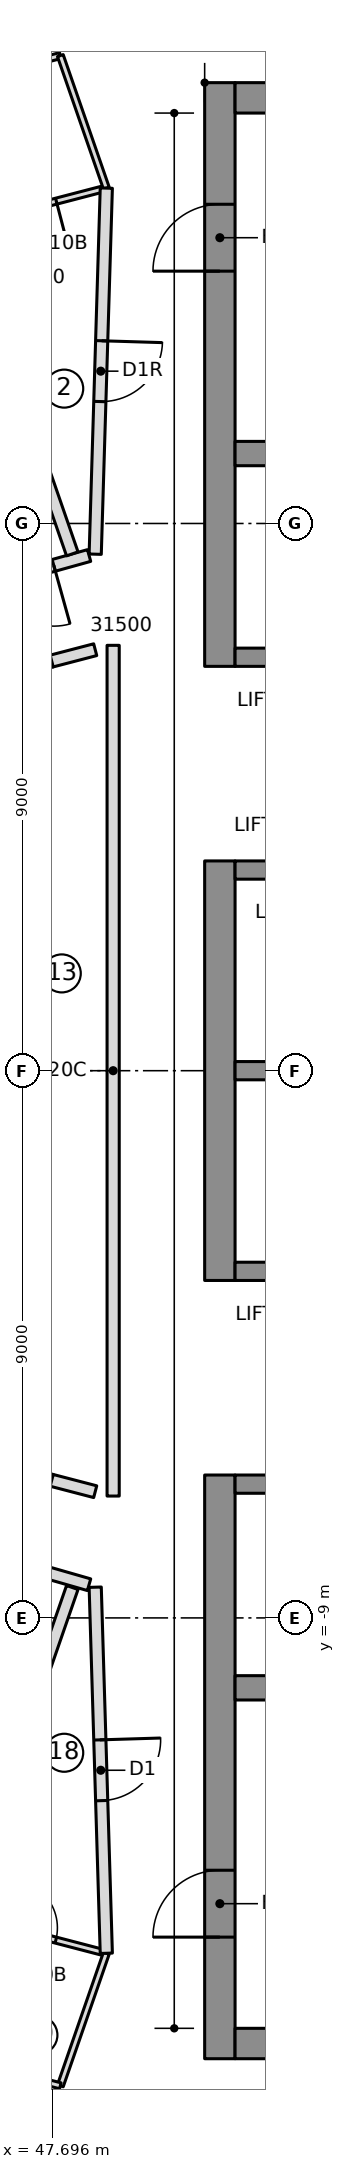
"""IFC4 building model, lengths in metres.
Left out: names, types, materials, properties, quantities, classifications, styles, units other than length and angle.
Written with IfcOpenShell. Run it as: python <this file> out.ifc"""

import sys

from ifc_helpers import new_model, si_unit, direction, frame, frame_2d, origin, place, context, subcontext, project, spatial, rectangle, extrude, element, fill, save


model = new_model("IFC4")
c1 = context("Model", 3, precision=1e-05, world=origin(), true_north=direction((0.0, 1.0)))
c2 = subcontext(c1, "Body", "Model", "MODEL_VIEW")
j1 = project(units=[si_unit("LENGTHUNIT", "METRE"), si_unit("PLANEANGLEUNIT", "RADIAN")], contexts=[c1])
p1 = place(None, origin())
s1 = spatial("IfcSite", under=j1, at=p1, CompositionType="ELEMENT")
p2 = place(p1, origin())
s2 = spatial("IfcBuilding", under=s1, at=p2, CompositionType="ELEMENT")
p3 = place(p2, frame((0.0, 0.0, 285.65)))
s3 = spatial("IfcBuildingStorey", under=s2, at=p3, CompositionType="ELEMENT", Elevation=285.65)
p4 = place(p3, frame((50.45, 6.65, 0.0), z_axis=(0.0, 0.0, 1.0), x_axis=(0.0, 1.0, 0.0)))
e1 = element("IfcWall", 1, at=p4, inside=s3, PredefinedType="SHEAR", context=c2, shape_type="SweptSolid", body=[
    extrude(rectangle(XDim=9.6, YDim=0.5, at=frame_2d((4.8, 0.0))), origin(), (0.0, 0.0, 1.0), 3.55),
])
p5 = place(p4, frame((6.5, 0.0, 0.0)))
e2 = element("IfcOpeningElement", 2, at=p5, cuts=e1, PredefinedType="OPENING", context=c2, shape_type="SweptSolid", body=[
    extrude(rectangle(XDim=1.1, YDim=2.1, at=frame_2d((0.55, 1.05))), frame((0.0, 0.26, 0.0), z_axis=(0.0, -1.0, 0.0), x_axis=(1.0, 0.0, 0.0)), (0.0, 0.0, 1.0), 0.52),
])
p6 = place(p3, frame((50.45, -3.45, 0.0), z_axis=(0.0, 0.0, 1.0), x_axis=(0.0, 1.0, 0.0)))
e3 = element("IfcWall", 3, at=p6, inside=s3, PredefinedType="SHEAR", context=c2, shape_type="SweptSolid", body=[
    extrude(rectangle(XDim=6.9, YDim=0.5, at=frame_2d((3.45, 0.0))), origin(), (0.0, 0.0, 1.0), 3.55),
])
p7 = place(p3, frame((50.45, -16.25, 0.0), z_axis=(0.0, 0.0, 1.0), x_axis=(0.0, 1.0, 0.0)))
e4 = element("IfcWall", 4, at=p7, inside=s3, PredefinedType="SHEAR", context=c2, shape_type="SweptSolid", body=[
    extrude(rectangle(XDim=9.6, YDim=0.5, at=frame_2d((4.8, 0.0))), origin(), (0.0, 0.0, 1.0), 3.55),
])
p8 = place(p7, frame((2.0, 0.0, 0.0)))
e5 = element("IfcOpeningElement", 5, at=p8, cuts=e4, PredefinedType="OPENING", context=c2, shape_type="SweptSolid", body=[
    extrude(rectangle(XDim=1.1, YDim=2.1, at=frame_2d((0.55, 1.05))), frame((0.0, 0.26, 0.0), z_axis=(0.0, -1.0, 0.0), x_axis=(1.0, 0.0, 0.0)), (0.0, 0.0, 1.0), 0.52),
])
for number, where, z_axis, x_axis in (
    (6, (50.7, 16.0, 0.0), (0.0, 0.0, 1.0), (1.0, 0.0, 0.0)),
    (7, (50.7, -16.0, 0.0), (0.0, 0.0, 1.0), (1.0, 0.0, 0.0)),
):
    element("IfcWall", number, at=place(p3, frame(where, z_axis=z_axis, x_axis=x_axis)), inside=s3, PredefinedType="SHEAR", context=c2, shape_type="SweptSolid", body=[
        extrude(rectangle(XDim=13.52, YDim=0.5, at=frame_2d((6.76, 0.0))), origin(), (0.0, 0.0, 1.0), 3.55),
    ])
p9 = place(p3, frame((50.7, 10.15, 0.0), z_axis=(0.0, 0.0, 1.0), x_axis=(1.0, 0.0, 0.0)))
e8 = element("IfcWall", 8, at=p9, inside=s3, PredefinedType="SHEAR", context=c2, shape_type="SweptSolid", body=[
    extrude(rectangle(XDim=13.02, YDim=0.4, at=frame_2d((6.51, 0.0))), origin(), (0.0, 0.0, 1.0), 3.55),
])
p10 = place(p9, frame((0.7, 0.0, 0.0)))
e9 = element("IfcOpeningElement", 9, at=p10, cuts=e8, PredefinedType="OPENING", context=c2, shape_type="SweptSolid", body=[
    extrude(rectangle(XDim=1.1, YDim=2.1, at=frame_2d((0.55, 1.05))), frame((0.0, 0.21, 0.0), z_axis=(0.0, -1.0, 0.0), x_axis=(1.0, 0.0, 0.0)), (0.0, 0.0, 1.0), 0.42),
])
p11 = place(p9, frame((3.5, 0.0, 0.0)))
e10 = element("IfcOpeningElement", 10, at=p11, cuts=e8, PredefinedType="OPENING", context=c2, shape_type="SweptSolid", body=[
    extrude(rectangle(XDim=1.1, YDim=2.1, at=frame_2d((0.55, 1.05))), frame((0.0, 0.21, 0.0), z_axis=(0.0, -1.0, 0.0), x_axis=(1.0, 0.0, 0.0)), (0.0, 0.0, 1.0), 0.42),
])
p12 = place(p3, frame((50.7, -10.15, 0.0), z_axis=(0.0, 0.0, 1.0), x_axis=(1.0, 0.0, 0.0)))
e11 = element("IfcWall", 11, at=p12, inside=s3, PredefinedType="SHEAR", context=c2, shape_type="SweptSolid", body=[
    extrude(rectangle(XDim=13.02, YDim=0.4, at=frame_2d((6.51, 0.0))), origin(), (0.0, 0.0, 1.0), 3.55),
])
p13 = place(p3, frame((50.7, 0.0, 0.0), z_axis=(0.0, 0.0, 1.0), x_axis=(1.0, 0.0, 0.0)))
e12 = element("IfcWall", 12, at=p13, inside=s3, PredefinedType="SHEAR", context=c2, shape_type="SweptSolid", body=[
    extrude(rectangle(XDim=10.9, YDim=0.3, at=frame_2d((5.45, 0.0))), origin(), (0.0, 0.0, 1.0), 3.55),
])
p14 = place(p3, frame((50.7, 3.3, 0.0), z_axis=(0.0, 0.0, 1.0), x_axis=(1.0, 0.0, 0.0)))
e13 = element("IfcWall", 13, at=p14, inside=s3, PredefinedType="SHEAR", context=c2, shape_type="SweptSolid", body=[
    extrude(rectangle(XDim=10.9, YDim=0.3, at=frame_2d((5.45, 0.0))), origin(), (0.0, 0.0, 1.0), 3.55),
])
p15 = place(p14, frame((0.7, 0.0, 0.0)))
e14 = element("IfcOpeningElement", 14, at=p15, cuts=e13, PredefinedType="OPENING", context=c2, shape_type="SweptSolid", body=[
    extrude(rectangle(XDim=1.1, YDim=2.1, at=frame_2d((0.55, 1.05))), frame((0.0, 0.16, 0.0), z_axis=(0.0, -1.0, 0.0), x_axis=(1.0, 0.0, 0.0)), (0.0, 0.0, 1.0), 0.32),
])
p16 = place(p14, frame((3.5, 0.0, 0.0)))
e15 = element("IfcOpeningElement", 15, at=p16, cuts=e13, PredefinedType="OPENING", context=c2, shape_type="SweptSolid", body=[
    extrude(rectangle(XDim=1.1, YDim=2.1, at=frame_2d((0.55, 1.05))), frame((0.0, 0.16, 0.0), z_axis=(0.0, -1.0, 0.0), x_axis=(1.0, 0.0, 0.0)), (0.0, 0.0, 1.0), 0.32),
])
p17 = place(p14, frame((6.4, 0.0, 0.0)))
e16 = element("IfcOpeningElement", 16, at=p17, cuts=e13, PredefinedType="OPENING", context=c2, shape_type="SweptSolid", body=[
    extrude(rectangle(XDim=0.9, YDim=2.1, at=frame_2d((0.45, 1.05))), frame((0.0, 0.16, 0.0), z_axis=(0.0, -1.0, 0.0), x_axis=(1.0, 0.0, 0.0)), (0.0, 0.0, 1.0), 0.32),
])
p18 = place(p14, frame((9.2, 0.0, 0.0)))
e17 = element("IfcOpeningElement", 17, at=p18, cuts=e13, PredefinedType="OPENING", context=c2, shape_type="SweptSolid", body=[
    extrude(rectangle(XDim=0.9, YDim=2.1, at=frame_2d((0.45, 1.05))), frame((0.0, 0.16, 0.0), z_axis=(0.0, -1.0, 0.0), x_axis=(1.0, 0.0, 0.0)), (0.0, 0.0, 1.0), 0.32),
])
p19 = place(p3, frame((50.7, 6.8, 0.0), z_axis=(0.0, 0.0, 1.0), x_axis=(1.0, 0.0, 0.0)))
e18 = element("IfcWall", 18, at=p19, inside=s3, PredefinedType="SHEAR", context=c2, shape_type="SweptSolid", body=[
    extrude(rectangle(XDim=10.9, YDim=0.3, at=frame_2d((5.45, 0.0))), origin(), (0.0, 0.0, 1.0), 3.55),
])
p20 = place(p19, frame((6.4, 0.0, 0.0)))
e19 = element("IfcOpeningElement", 19, at=p20, cuts=e18, PredefinedType="OPENING", context=c2, shape_type="SweptSolid", body=[
    extrude(rectangle(XDim=0.9, YDim=2.1, at=frame_2d((0.45, 1.05))), frame((0.0, 0.16, 0.0), z_axis=(0.0, -1.0, 0.0), x_axis=(1.0, 0.0, 0.0)), (0.0, 0.0, 1.0), 0.32),
])
p21 = place(p19, frame((9.2, 0.0, 0.0)))
e20 = element("IfcOpeningElement", 20, at=p21, cuts=e18, PredefinedType="OPENING", context=c2, shape_type="SweptSolid", body=[
    extrude(rectangle(XDim=0.9, YDim=2.1, at=frame_2d((0.45, 1.05))), frame((0.0, 0.16, 0.0), z_axis=(0.0, -1.0, 0.0), x_axis=(1.0, 0.0, 0.0)), (0.0, 0.0, 1.0), 0.32),
])
p22 = place(p3, frame((50.7, -3.3, 0.0), z_axis=(0.0, 0.0, 1.0), x_axis=(1.0, 0.0, 0.0)))
e21 = element("IfcWall", 21, at=p22, inside=s3, PredefinedType="SHEAR", context=c2, shape_type="SweptSolid", body=[
    extrude(rectangle(XDim=10.9, YDim=0.3, at=frame_2d((5.45, 0.0))), origin(), (0.0, 0.0, 1.0), 3.55),
])
p23 = place(p22, frame((9.1, 0.0, 0.0)))
e22 = element("IfcOpeningElement", 22, at=p23, cuts=e21, PredefinedType="OPENING", context=c2, shape_type="SweptSolid", body=[
    extrude(rectangle(XDim=1.1, YDim=2.1, at=frame_2d((0.55, 1.05))), frame((0.0, 0.16, 0.0), z_axis=(0.0, -1.0, 0.0), x_axis=(1.0, 0.0, 0.0)), (0.0, 0.0, 1.0), 0.32),
])
p24 = place(p3, frame((50.7, -6.8, 0.0), z_axis=(0.0, 0.0, 1.0), x_axis=(1.0, 0.0, 0.0)))
e23 = element("IfcWall", 23, at=p24, inside=s3, PredefinedType="SHEAR", context=c2, shape_type="SweptSolid", body=[
    extrude(rectangle(XDim=10.9, YDim=0.3, at=frame_2d((5.45, 0.0))), origin(), (0.0, 0.0, 1.0), 3.55),
])
p25 = place(p24, frame((6.3, 0.0, 0.0)))
e24 = element("IfcOpeningElement", 24, at=p25, cuts=e23, PredefinedType="OPENING", context=c2, shape_type="SweptSolid", body=[
    extrude(rectangle(XDim=1.1, YDim=2.1, at=frame_2d((0.55, 1.05))), frame((0.0, 0.16, 0.0), z_axis=(0.0, -1.0, 0.0), x_axis=(1.0, 0.0, 0.0)), (0.0, 0.0, 1.0), 0.32),
])
p26 = place(p24, frame((9.1, 0.0, 0.0)))
e25 = element("IfcOpeningElement", 25, at=p26, cuts=e23, PredefinedType="OPENING", context=c2, shape_type="SweptSolid", body=[
    extrude(rectangle(XDim=1.1, YDim=2.1, at=frame_2d((0.55, 1.05))), frame((0.0, 0.16, 0.0), z_axis=(0.0, -1.0, 0.0), x_axis=(1.0, 0.0, 0.0)), (0.0, 0.0, 1.0), 0.32),
])
p27 = place(p24, frame((0.8, 0.0, 0.0)))
e26 = element("IfcOpeningElement", 26, at=p27, cuts=e23, PredefinedType="OPENING", context=c2, shape_type="SweptSolid", body=[
    extrude(rectangle(XDim=0.9, YDim=2.1, at=frame_2d((0.45, 1.05))), frame((0.0, 0.16, 0.0), z_axis=(0.0, -1.0, 0.0), x_axis=(1.0, 0.0, 0.0)), (0.0, 0.0, 1.0), 0.32),
])
p28 = place(p24, frame((3.6, 0.0, 0.0)))
e27 = element("IfcOpeningElement", 27, at=p28, cuts=e23, PredefinedType="OPENING", context=c2, shape_type="SweptSolid", body=[
    extrude(rectangle(XDim=0.9, YDim=2.1, at=frame_2d((0.45, 1.05))), frame((0.0, 0.16, 0.0), z_axis=(0.0, -1.0, 0.0), x_axis=(1.0, 0.0, 0.0)), (0.0, 0.0, 1.0), 0.32),
])
p29 = place(p3, frame((48.299, 8.473, 0.0), z_axis=(0.0, 0.0, 1.0), x_axis=(-0.96343417102, -0.267945140115, 0.0)))
e28 = element("IfcWall", 28, at=p29, inside=s3, PredefinedType="PARTITIONING", context=c2, shape_type="SweptSolid", body=[
    extrude(rectangle(XDim=4.43, YDim=0.2, at=frame_2d((2.215, 0.0))), origin(), (0.0, 0.0, 1.0), 3.25),
])
p30 = place(p29, frame((0.603, 0.0, 0.0)))
e29 = element("IfcOpeningElement", 29, at=p30, cuts=e28, PredefinedType="OPENING", context=c2, shape_type="SweptSolid", body=[
    extrude(rectangle(XDim=1.0, YDim=2.1, at=frame_2d((0.5, 1.05))), frame((0.0, 0.11, 0.0), z_axis=(0.0, -1.0, 0.0), x_axis=(1.0, 0.0, 0.0)), (0.0, 0.0, 1.0), 0.22),
])
p31 = place(p3, frame((48.023, 8.5, 0.0), z_axis=(0.0, 0.0, 1.0), x_axis=(-0.327705598625, 0.944779890043, 0.0)))
e30 = element("IfcWall", 30, at=p31, inside=s3, PredefinedType="PARTITIONING", context=c2, shape_type="SweptSolid", body=[
    extrude(rectangle(XDim=9.61, YDim=0.2, at=frame_2d((4.805, 0.0))), origin(), (0.0, 0.0, 1.0), 3.25),
])
p32 = place(p3, frame((48.583, 14.516, 0.0), z_axis=(0.0, 0.0, 1.0), x_axis=(-0.967665843663, -0.252235633897, 0.0)))
e31 = element("IfcWall", 31, at=p32, inside=s3, PredefinedType="PARTITIONING", context=c2, shape_type="SweptSolid", body=[
    extrude(rectangle(XDim=2.508, YDim=0.1, at=frame_2d((1.254, 0.0))), origin(), (0.0, 0.0, 1.0), 3.25),
])
p33 = place(p32, frame((0.85, 0.0, 0.0)))
e32 = element("IfcOpeningElement", 32, at=p33, cuts=e31, PredefinedType="OPENING", context=c2, shape_type="SweptSolid", body=[
    extrude(rectangle(XDim=0.8, YDim=2.1, at=frame_2d((0.4, 1.05))), frame((0.0, 0.06, 0.0), z_axis=(0.0, -1.0, 0.0), x_axis=(1.0, 0.0, 0.0)), (0.0, 0.0, 1.0), 0.12),
])
p34 = place(p3, frame((45.955, 16.208, 0.0), z_axis=(0.0, 0.0, 1.0), x_axis=(0.967650770907, 0.25229345129, 0.0)))
e33 = element("IfcWall", 33, at=p34, inside=s3, PredefinedType="PARTITIONING", context=c2, shape_type="SweptSolid", body=[
    extrude(rectangle(XDim=1.934, YDim=0.1, at=frame_2d((0.967, 0.0))), origin(), (0.0, 0.0, 1.0), 3.25),
])
p35 = place(p3, frame((47.826, 16.696, 0.0), z_axis=(0.0, 0.0, 1.0), x_axis=(0.327695604762, -0.944783356447, 0.0)))
e34 = element("IfcWall", 34, at=p35, inside=s3, PredefinedType="PARTITIONING", context=c2, shape_type="SweptSolid", body=[
    extrude(rectangle(XDim=2.307, YDim=0.1, at=frame_2d((1.154, 0.0))), origin(), (0.0, 0.0, 1.0), 3.25),
])
p36 = place(p3, frame((40.035, -6.083, 0.0), z_axis=(0.0, 0.0, 1.0), x_axis=(0.961195333593, -0.275868683759, 0.0)))
e35 = element("IfcWall", 35, at=p36, inside=s3, PredefinedType="PARTITIONING", context=c2, shape_type="SweptSolid", body=[
    extrude(rectangle(XDim=8.597, YDim=0.2, at=frame_2d((4.298, 0.0))), origin(), (0.0, 0.0, 1.0), 3.25),
])
p37 = place(p36, frame((3.05, 0.0, 0.0)))
e36 = element("IfcOpeningElement", 36, at=p37, cuts=e35, PredefinedType="OPENING", context=c2, shape_type="SweptSolid", body=[
    extrude(rectangle(XDim=1.5, YDim=2.1, at=frame_2d((0.75, 1.05))), frame((0.0, 0.11, 0.0), z_axis=(0.0, -1.0, 0.0), x_axis=(1.0, 0.0, 0.0)), (0.0, 0.0, 1.0), 0.22),
])
p38 = place(p3, frame((44.874, -17.579, 0.0), z_axis=(0.0, 0.0, 1.0), x_axis=(0.327705598625, 0.944779890043, 0.0)))
e37 = element("IfcWall", 37, at=p38, inside=s3, PredefinedType="PARTITIONING", context=c2, shape_type="SweptSolid", body=[
    extrude(rectangle(XDim=9.61, YDim=0.2, at=frame_2d((4.805, 0.0))), origin(), (0.0, 0.0, 1.0), 3.25),
])
p39 = place(p3, frame((46.156, -13.883, 0.0), z_axis=(0.0, 0.0, 1.0), x_axis=(0.967665843663, -0.252235633897, 0.0)))
e38 = element("IfcWall", 38, at=p39, inside=s3, PredefinedType="PARTITIONING", context=c2, shape_type="SweptSolid", body=[
    extrude(rectangle(XDim=2.508, YDim=0.1, at=frame_2d((1.254, 0.0))), origin(), (0.0, 0.0, 1.0), 3.25),
])
p40 = place(p39, frame((0.85, 0.0, 0.0)))
e39 = element("IfcOpeningElement", 39, at=p40, cuts=e38, PredefinedType="OPENING", context=c2, shape_type="SweptSolid", body=[
    extrude(rectangle(XDim=0.8, YDim=2.1, at=frame_2d((0.4, 1.05))), frame((0.0, 0.06, 0.0), z_axis=(0.0, -1.0, 0.0), x_axis=(1.0, 0.0, 0.0)), (0.0, 0.0, 1.0), 0.12),
])
p41 = place(p3, frame((48.583, -14.516, 0.0), z_axis=(0.0, 0.0, 1.0), x_axis=(-0.327695604762, -0.944783356447, 0.0)))
e40 = element("IfcWall", 40, at=p41, inside=s3, PredefinedType="PARTITIONING", context=c2, shape_type="SweptSolid", body=[
    extrude(rectangle(XDim=2.307, YDim=0.1, at=frame_2d((1.154, 0.0))), origin(), (0.0, 0.0, 1.0), 3.25),
])
p42 = place(p3, frame((47.826, -16.696, 0.0), z_axis=(0.0, 0.0, 1.0), x_axis=(-0.967650770907, 0.25229345129, 0.0)))
e41 = element("IfcWall", 41, at=p42, inside=s3, PredefinedType="PARTITIONING", context=c2, shape_type="SweptSolid", body=[
    extrude(rectangle(XDim=1.934, YDim=0.1, at=frame_2d((0.967, 0.0))), origin(), (0.0, 0.0, 1.0), 3.25),
])
p43 = place(p3, frame((43.918, 5.675, 0.0), z_axis=(0.0, 0.0, 1.0), x_axis=(0.962411212211, 0.271596499628, 0.0)))
e42 = element("IfcWall", 42, at=p43, inside=s3, PredefinedType="PARTITIONING", context=c2, shape_type="SweptSolid", body=[
    extrude(rectangle(XDim=3.913, YDim=0.2, at=frame_2d((1.957, 0.0))), origin(), (0.0, 0.0, 1.0), 3.25),
])
p44 = place(p43, frame((1.457, 0.0, 0.0)))
e43 = element("IfcOpeningElement", 43, at=p44, cuts=e42, PredefinedType="OPENING", context=c2, shape_type="SweptSolid", body=[
    extrude(rectangle(XDim=1.0, YDim=2.1, at=frame_2d((0.5, 1.05))), frame((0.0, 0.11, 0.0), z_axis=(0.0, -1.0, 0.0), x_axis=(1.0, 0.0, 0.0)), (0.0, 0.0, 1.0), 0.22),
])
p45 = place(p3, frame((47.684, -6.738, 0.0), z_axis=(0.0, 0.0, 1.0), x_axis=(-0.962411212211, 0.271596499628, 0.0)))
e44 = element("IfcWall", 44, at=p45, inside=s3, PredefinedType="PARTITIONING", context=c2, shape_type="SweptSolid", body=[
    extrude(rectangle(XDim=3.913, YDim=0.2, at=frame_2d((1.957, 0.0))), origin(), (0.0, 0.0, 1.0), 3.25),
])
for number, where, z_axis, x_axis in (
    (45, (47.684, 6.738, 0.0), (0.0, 0.0, 1.0), (0.968, 0.253, 0.0)),
    (46, (48.4, -6.924, 0.0), (0.0, 0.0, 1.0), (-0.968, 0.253, 0.0)),
):
    element("IfcWall", number, at=place(p3, frame(where, z_axis=z_axis, x_axis=x_axis)), inside=s3, PredefinedType="PARTITIONING", context=c2, shape_type="SweptSolid", body=[
        extrude(rectangle(XDim=0.74, YDim=0.2, at=frame_2d((0.37, 0.0))), origin(), (0.0, 0.0, 1.0), 3.25),
    ])
p46 = place(p3, frame((48.583, 14.516, 0.0), z_axis=(0.0, 0.0, 1.0), x_axis=(-0.030318578026, -0.999540286245, 0.0)))
e47 = element("IfcWall", 47, at=p46, inside=s3, PredefinedType="PARTITIONING", context=c2, shape_type="SweptSolid", body=[
    extrude(rectangle(XDim=6.023, YDim=0.2, at=frame_2d((3.012, 0.0))), origin(), (0.0, 0.0, 1.0), 3.25),
])
p47 = place(p46, frame((2.512, 0.0, 0.0)))
e48 = element("IfcOpeningElement", 48, at=p47, cuts=e47, PredefinedType="OPENING", context=c2, shape_type="SweptSolid", body=[
    extrude(rectangle(XDim=1.0, YDim=2.1, at=frame_2d((0.5, 1.05))), frame((0.0, 0.11, 0.0), z_axis=(0.0, -1.0, 0.0), x_axis=(1.0, 0.0, 0.0)), (0.0, 0.0, 1.0), 0.22),
])
p48 = place(p3, frame((48.4, -8.495, 0.0), z_axis=(0.0, 0.0, 1.0), x_axis=(0.030318578026, -0.999540286245, 0.0)))
e49 = element("IfcWall", 49, at=p48, inside=s3, PredefinedType="PARTITIONING", context=c2, shape_type="SweptSolid", body=[
    extrude(rectangle(XDim=6.023, YDim=0.2, at=frame_2d((3.012, 0.0))), origin(), (0.0, 0.0, 1.0), 3.25),
])
p49 = place(p48, frame((2.512, 0.0, 0.0)))
e50 = element("IfcOpeningElement", 50, at=p49, cuts=e49, PredefinedType="OPENING", context=c2, shape_type="SweptSolid", body=[
    extrude(rectangle(XDim=1.0, YDim=2.1, at=frame_2d((0.5, 1.05))), frame((0.0, 0.11, 0.0), z_axis=(0.0, -1.0, 0.0), x_axis=(1.0, 0.0, 0.0)), (0.0, 0.0, 1.0), 0.22),
])
p50 = place(p3, frame((48.695, 6.996, 0.0), z_axis=(0.0, 0.0, 1.0), x_axis=(0.0, -1.0, 0.0)))
e51 = element("IfcWall", 51, at=p50, inside=s3, PredefinedType="PARTITIONING", context=c2, shape_type="SweptSolid", body=[
    extrude(rectangle(XDim=13.992, YDim=0.2, at=frame_2d((6.996, 0.0))), origin(), (0.0, 0.0, 1.0), 3.25),
])
p51 = place(p30, origin())
e52 = element("IfcDoor", 52, at=p51, inside=s3, OperationType="SINGLE_SWING_RIGHT", PredefinedType="DOOR", context=c2, shape_type="SweptSolid", body=[
    extrude(rectangle(XDim=1.0, YDim=2.1, at=frame_2d((0.5, 1.05))), frame((0.0, 0.025, 0.0), z_axis=(0.0, -1.0, 0.0), x_axis=(1.0, 0.0, 0.0)), (0.0, 0.0, 1.0), 0.05),
])
fill(e29, e52)
p52 = place(p33, origin())
e53 = element("IfcDoor", 53, at=p52, inside=s3, OperationType="SINGLE_SWING_LEFT", PredefinedType="DOOR", context=c2, shape_type="SweptSolid", body=[
    extrude(rectangle(XDim=0.8, YDim=2.1, at=frame_2d((0.4, 1.05))), frame((0.0, 0.025, 0.0), z_axis=(0.0, -1.0, 0.0), x_axis=(1.0, 0.0, 0.0)), (0.0, 0.0, 1.0), 0.05),
])
fill(e32, e53)
p53 = place(p40, origin())
e54 = element("IfcDoor", 54, at=p53, inside=s3, OperationType="SINGLE_SWING_LEFT", PredefinedType="DOOR", context=c2, shape_type="SweptSolid", body=[
    extrude(rectangle(XDim=0.8, YDim=2.1, at=frame_2d((0.4, 1.05))), frame((0.0, 0.025, 0.0), z_axis=(0.0, -1.0, 0.0), x_axis=(1.0, 0.0, 0.0)), (0.0, 0.0, 1.0), 0.05),
])
fill(e39, e54)
p54 = place(p47, origin())
e55 = element("IfcDoor", 55, at=p54, inside=s3, OperationType="SINGLE_SWING_RIGHT", PredefinedType="DOOR", context=c2, shape_type="SweptSolid", body=[
    extrude(rectangle(XDim=1.0, YDim=2.1, at=frame_2d((0.5, 1.05))), frame((0.0, 0.025, 0.0), z_axis=(0.0, -1.0, 0.0), x_axis=(1.0, 0.0, 0.0)), (0.0, 0.0, 1.0), 0.05),
])
fill(e48, e55)
p55 = place(p49, origin())
e56 = element("IfcDoor", 56, at=p55, inside=s3, OperationType="SINGLE_SWING_LEFT", PredefinedType="DOOR", context=c2, shape_type="SweptSolid", body=[
    extrude(rectangle(XDim=1.0, YDim=2.1, at=frame_2d((0.5, 1.05))), frame((0.0, 0.025, 0.0), z_axis=(0.0, -1.0, 0.0), x_axis=(1.0, 0.0, 0.0)), (0.0, 0.0, 1.0), 0.05),
])
fill(e50, e56)
p56 = place(p5, origin())
e57 = element("IfcDoor", 57, at=p56, inside=s3, OperationType="SINGLE_SWING_RIGHT", PredefinedType="DOOR", context=c2, shape_type="SweptSolid", body=[
    extrude(rectangle(XDim=1.1, YDim=2.1, at=frame_2d((0.55, 1.05))), frame((0.0, 0.025, 0.0), z_axis=(0.0, -1.0, 0.0), x_axis=(1.0, 0.0, 0.0)), (0.0, 0.0, 1.0), 0.05),
])
fill(e2, e57)
p57 = place(p8, origin())
e58 = element("IfcDoor", 58, at=p57, inside=s3, OperationType="SINGLE_SWING_RIGHT", PredefinedType="DOOR", context=c2, shape_type="SweptSolid", body=[
    extrude(rectangle(XDim=1.1, YDim=2.1, at=frame_2d((0.55, 1.05))), frame((0.0, 0.025, 0.0), z_axis=(0.0, -1.0, 0.0), x_axis=(1.0, 0.0, 0.0)), (0.0, 0.0, 1.0), 0.05),
])
fill(e5, e58)
save(model, sys.argv[1])
